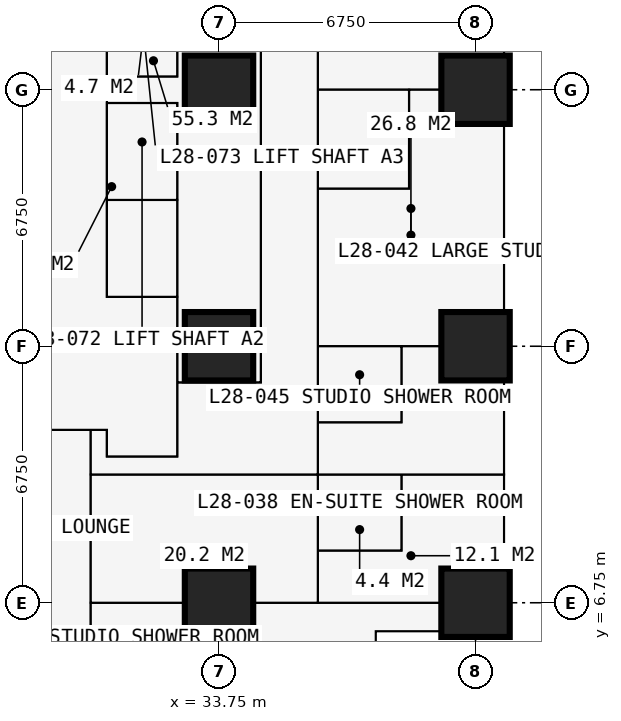
"""IFC4 building model, lengths in metres.
Left out: names, types, materials, properties, quantities, classifications, styles, units other than length and angle.
Written with IfcOpenShell. Run it as: python <this file> out.ifc"""

import sys

from ifc_helpers import new_model, si_unit, direction, frame, frame_2d, origin, origin_2d, place, context, subcontext, project, spatial, rectangle, extrude, element, fill, save


model = new_model("IFC4")
c1 = context("Model", 3, precision=1e-05, world=origin(), true_north=direction((0.0, 1.0)))
c2 = subcontext(c1, "Body", "Model", "MODEL_VIEW")
j1 = project(units=[si_unit("LENGTHUNIT", "METRE"), si_unit("PLANEANGLEUNIT", "RADIAN")], contexts=[c1])
p1 = place(None, origin())
s1 = spatial("IfcSite", under=j1, at=p1, CompositionType="ELEMENT")
p2 = place(p1, origin())
s2 = spatial("IfcBuilding", under=s1, at=p2, CompositionType="ELEMENT")
p3 = place(p2, frame((0.0, 0.0, 105.3)))
s3 = spatial("IfcBuildingStorey", under=s2, at=p3, CompositionType="ELEMENT", Elevation=105.3)
for number, where, z_axis, x_axis in (
    (1, (33.75, 6.75, 0.0), (0.0, 0.0, 1.0), (1.0, 0.0, 0.0)),
    (2, (33.75, 13.5, 0.0), (0.0, 0.0, 1.0), (1.0, 0.0, 0.0)),
    (3, (33.75, 20.25, 0.0), (0.0, 0.0, 1.0), (1.0, 0.0, 0.0)),
    (4, (40.5, 6.75, 0.0), (0.0, 0.0, 1.0), (1.0, 0.0, 0.0)),
    (5, (40.5, 13.5, 0.0), (0.0, 0.0, 1.0), (1.0, 0.0, 0.0)),
    (6, (40.5, 20.25, 0.0), (0.0, 0.0, 1.0), (1.0, 0.0, 0.0)),
):
    element("IfcColumn", number, at=place(p3, frame(where, z_axis=z_axis, x_axis=x_axis)), inside=s3, PredefinedType="COLUMN", context=c2, shape_type="SweptSolid", body=[
        extrude(rectangle(XDim=1.8, YDim=1.8, at=origin_2d()), origin(), (0.0, 0.0, 1.0), 3.6),
    ])
p4 = place(p3, frame((37.875, 2.625, 0.0), z_axis=(0.0, 0.0, 1.0), x_axis=(0.0, 1.0, 0.0)))
e7 = element("IfcWall", 7, at=p4, inside=s3, PredefinedType="SOLIDWALL", context=c2, shape_type="SweptSolid", body=[
    extrude(rectangle(XDim=3.375, YDim=0.3, at=frame_2d((1.688, 0.0))), origin(), (0.0, 0.0, 1.0), 3.375),
])
p5 = place(p4, frame((0.788, 0.0, 0.6)))
e8 = element("IfcOpeningElement", 8, at=p5, cuts=e7, PredefinedType="OPENING", context=c2, shape_type="SweptSolid", body=[
    extrude(rectangle(XDim=1.8, YDim=2.1, at=frame_2d((0.9, 1.05))), frame((0.0, 0.16, 0.0), z_axis=(0.0, -1.0, 0.0), x_axis=(1.0, 0.0, 0.0)), (0.0, 0.0, 1.0), 0.32),
])
p6 = place(p3, frame((37.875, 6.0, 0.0), z_axis=(0.0, 0.0, 1.0), x_axis=(1.0, 0.0, 0.0)))
e9 = element("IfcWall", 9, at=p6, inside=s3, PredefinedType="SOLIDWALL", context=c2, shape_type="SweptSolid", body=[
    extrude(rectangle(XDim=3.375, YDim=0.3, at=frame_2d((1.688, 0.0))), origin(), (0.0, 0.0, 1.0), 3.375),
])
p7 = place(p6, frame((0.343, 0.0, 0.9)))
e10 = element("IfcOpeningElement", 10, at=p7, cuts=e9, PredefinedType="OPENING", context=c2, shape_type="SweptSolid", body=[
    extrude(rectangle(XDim=1.2, YDim=1.8, at=frame_2d((0.6, 0.9))), frame((0.0, 0.16, 0.0), z_axis=(0.0, -1.0, 0.0), x_axis=(1.0, 0.0, 0.0)), (0.0, 0.0, 1.0), 0.32),
])
p8 = place(p3, frame((10.125, 11.3, 0.0), z_axis=(0.0, 0.0, 1.0), x_axis=(1.0, 0.0, 0.0)))
e11 = element("IfcWall", 11, at=p8, inside=s3, PredefinedType="PARTITIONING", context=c2, shape_type="SweptSolid", body=[
    extrude(rectangle(XDim=20.675, YDim=0.15, at=frame_2d((10.337, 0.0))), origin(), (0.0, 0.0, 1.0), 3.375),
])
p9 = place(p8, frame((1.775, 0.0, 0.0)))
e12 = element("IfcOpeningElement", 12, at=p9, cuts=e11, PredefinedType="OPENING", context=c2, shape_type="SweptSolid", body=[
    extrude(rectangle(XDim=1.0, YDim=2.2, at=frame_2d((0.5, 1.1))), frame((0.0, 0.085, 0.0), z_axis=(0.0, -1.0, 0.0), x_axis=(1.0, 0.0, 0.0)), (0.0, 0.0, 1.0), 0.17),
])
p10 = place(p8, frame((11.312, 0.0, 0.0)))
e13 = element("IfcOpeningElement", 13, at=p10, cuts=e11, PredefinedType="OPENING", context=c2, shape_type="SweptSolid", body=[
    extrude(rectangle(XDim=1.0, YDim=2.2, at=frame_2d((0.5, 1.1))), frame((0.0, 0.085, 0.0), z_axis=(0.0, -1.0, 0.0), x_axis=(1.0, 0.0, 0.0)), (0.0, 0.0, 1.0), 0.17),
])
p11 = place(p3, frame((30.375, -0.734, 0.0), z_axis=(0.0, 0.0, 1.0), x_axis=(0.0, 1.0, 0.0)))
e14 = element("IfcWall", 14, at=p11, inside=s3, PredefinedType="PARTITIONING", context=c2, shape_type="SweptSolid", body=[
    extrude(rectangle(XDim=12.034, YDim=0.15, at=frame_2d((6.017, 0.0))), origin(), (0.0, 0.0, 1.0), 3.375),
])
p12 = place(p3, frame((30.375, 6.75, 0.0), z_axis=(0.0, 0.0, 1.0), x_axis=(1.0, 0.0, 0.0)))
e15 = element("IfcWall", 15, at=p12, inside=s3, PredefinedType="PARTITIONING", context=c2, shape_type="SweptSolid", body=[
    extrude(rectangle(XDim=10.859, YDim=0.15, at=frame_2d((5.429, 0.0))), origin(), (0.0, 0.0, 1.0), 2.877),
])
p13 = place(p12, frame((1.45, 0.0, 0.0)))
e16 = element("IfcOpeningElement", 16, at=p13, cuts=e15, PredefinedType="OPENING", context=c2, shape_type="SweptSolid", body=[
    extrude(rectangle(XDim=1.0, YDim=2.2, at=frame_2d((0.5, 1.1))), frame((0.0, 0.085, 0.0), z_axis=(0.0, -1.0, 0.0), x_axis=(1.0, 0.0, 0.0)), (0.0, 0.0, 1.0), 0.17),
])
p14 = place(p3, frame((30.375, 10.125, 0.0), z_axis=(0.0, 0.0, 1.0), x_axis=(1.0, 0.0, 0.0)))
e17 = element("IfcWall", 17, at=p14, inside=s3, PredefinedType="PARTITIONING", context=c2, shape_type="SweptSolid", body=[
    extrude(rectangle(XDim=10.859, YDim=0.15, at=frame_2d((5.429, 0.0))), origin(), (0.0, 0.0, 1.0), 3.375),
])
p15 = place(p14, frame((2.5, 0.0, 0.0)))
e18 = element("IfcOpeningElement", 18, at=p15, cuts=e17, PredefinedType="OPENING", context=c2, shape_type="SweptSolid", body=[
    extrude(rectangle(XDim=1.0, YDim=2.2, at=frame_2d((0.5, 1.1))), frame((0.0, 0.085, 0.0), z_axis=(0.0, -1.0, 0.0), x_axis=(1.0, 0.0, 0.0)), (0.0, 0.0, 1.0), 0.17),
])
p16 = place(p3, frame((30.8, 10.6, 0.0), z_axis=(0.0, 0.0, 1.0), x_axis=(0.0, 1.0, 0.0)))
e19 = element("IfcWall", 19, at=p16, inside=s3, PredefinedType="PARTITIONING", context=c2, shape_type="SweptSolid", body=[
    extrude(rectangle(XDim=0.7, YDim=0.15, at=frame_2d((0.35, 0.0))), origin(), (0.0, 0.0, 1.0), 3.375),
])
p17 = place(p3, frame((30.8, 10.6, 0.0), z_axis=(0.0, 0.0, 1.0), x_axis=(1.0, 0.0, 0.0)))
e20 = element("IfcWall", 20, at=p17, inside=s3, PredefinedType="PARTITIONING", context=c2, shape_type="SweptSolid", body=[
    extrude(rectangle(XDim=1.85, YDim=0.15, at=frame_2d((0.925, 0.0))), origin(), (0.0, 0.0, 1.0), 3.375),
])
p18 = place(p3, frame((30.8, 14.8, 0.0), z_axis=(0.0, 0.0, 1.0), x_axis=(0.0, 1.0, 0.0)))
e21 = element("IfcWall", 21, at=p18, inside=s3, PredefinedType="PARTITIONING", context=c2, shape_type="SweptSolid", body=[
    extrude(rectangle(XDim=10.9, YDim=0.15, at=frame_2d((5.45, 0.0))), origin(), (0.0, 0.0, 1.0), 3.375),
])
p19 = place(p18, frame((0.75, 0.0, 0.0)))
e22 = element("IfcOpeningElement", 22, at=p19, cuts=e21, PredefinedType="OPENING", context=c2, shape_type="SweptSolid", body=[
    extrude(rectangle(XDim=1.1, YDim=2.2, at=frame_2d((0.55, 1.1))), frame((0.0, 0.085, 0.0), z_axis=(0.0, -1.0, 0.0), x_axis=(1.0, 0.0, 0.0)), (0.0, 0.0, 1.0), 0.17),
])
p20 = place(p18, frame((3.25, 0.0, 0.0)))
e23 = element("IfcOpeningElement", 23, at=p20, cuts=e21, PredefinedType="OPENING", context=c2, shape_type="SweptSolid", body=[
    extrude(rectangle(XDim=1.1, YDim=2.2, at=frame_2d((0.55, 1.1))), frame((0.0, 0.085, 0.0), z_axis=(0.0, -1.0, 0.0), x_axis=(1.0, 0.0, 0.0)), (0.0, 0.0, 1.0), 0.17),
])
p21 = place(p18, frame((6.5, 0.0, 0.0)))
e24 = element("IfcOpeningElement", 24, at=p21, cuts=e21, PredefinedType="OPENING", context=c2, shape_type="SweptSolid", body=[
    extrude(rectangle(XDim=1.1, YDim=2.2, at=frame_2d((0.55, 1.1))), frame((0.0, 0.085, 0.0), z_axis=(0.0, -1.0, 0.0), x_axis=(1.0, 0.0, 0.0)), (0.0, 0.0, 1.0), 0.17),
])
p22 = place(p18, frame((9.05, 0.0, 0.0)))
e25 = element("IfcOpeningElement", 25, at=p22, cuts=e21, PredefinedType="OPENING", context=c2, shape_type="SweptSolid", body=[
    extrude(rectangle(XDim=1.1, YDim=2.2, at=frame_2d((0.55, 1.1))), frame((0.0, 0.085, 0.0), z_axis=(0.0, -1.0, 0.0), x_axis=(1.0, 0.0, 0.0)), (0.0, 0.0, 1.0), 0.17),
])
for number, where, z_axis, x_axis in (
    (26, (30.8, 14.8, 0.0), (0.0, 0.0, 1.0), (1.0, 0.0, 0.0)),
    (27, (30.8, 17.35, 0.0), (0.0, 0.0, 1.0), (1.0, 0.0, 0.0)),
    (28, (30.8, 19.9, 0.0), (0.0, 0.0, 1.0), (1.0, 0.0, 0.0)),
    (29, (30.8, 20.6, 0.0), (0.0, 0.0, 1.0), (1.0, 0.0, 0.0)),
):
    element("IfcWall", number, at=place(p3, frame(where, z_axis=z_axis, x_axis=x_axis)), inside=s3, PredefinedType="SHEAR", context=c2, shape_type="SweptSolid", body=[
        extrude(rectangle(XDim=1.85, YDim=0.1, at=frame_2d((0.925, 0.0))), origin(), (0.0, 0.0, 1.0), 3.375),
    ])
p23 = place(p3, frame((32.65, 10.6, 0.0), z_axis=(0.0, 0.0, 1.0), x_axis=(0.0, 1.0, 0.0)))
e30 = element("IfcWall", 30, at=p23, inside=s3, PredefinedType="SHEAR", context=c2, shape_type="SweptSolid", body=[
    extrude(rectangle(XDim=9.3, YDim=0.1, at=frame_2d((4.65, 0.0))), origin(), (0.0, 0.0, 1.0), 3.375),
])
p24 = place(p23, frame((0.5, 0.0, 0.0)))
e31 = element("IfcOpeningElement", 31, at=p24, cuts=e30, PredefinedType="OPENING", context=c2, shape_type="SweptSolid", body=[
    extrude(rectangle(XDim=1.0, YDim=2.2, at=frame_2d((0.5, 1.1))), frame((0.0, 0.06, 0.0), z_axis=(0.0, -1.0, 0.0), x_axis=(1.0, 0.0, 0.0)), (0.0, 0.0, 1.0), 0.12),
])
p25 = place(p3, frame((32.65, 12.55, 0.0), z_axis=(0.0, 0.0, 1.0), x_axis=(1.0, 0.0, 0.0)))
e32 = element("IfcWall", 32, at=p25, inside=s3, PredefinedType="PARTITIONING", context=c2, shape_type="SweptSolid", body=[
    extrude(rectangle(XDim=2.2, YDim=0.15, at=frame_2d((1.1, 0.0))), origin(), (0.0, 0.0, 1.0), 3.375),
])
p26 = place(p3, frame((32.65, 20.6, 0.0), z_axis=(0.0, 0.0, 1.0), x_axis=(0.0, 1.0, 0.0)))
e33 = element("IfcWall", 33, at=p26, inside=s3, PredefinedType="PARTITIONING", context=c2, shape_type="SweptSolid", body=[
    extrude(rectangle(XDim=5.1, YDim=0.15, at=frame_2d((2.55, 0.0))), origin(), (0.0, 0.0, 1.0), 3.375),
])
p27 = place(p3, frame((34.85, 12.55, 0.0), z_axis=(0.0, 0.0, 1.0), x_axis=(0.0, 1.0, 0.0)))
e34 = element("IfcWall", 34, at=p27, inside=s3, PredefinedType="PARTITIONING", context=c2, shape_type="SweptSolid", body=[
    extrude(rectangle(XDim=17.825, YDim=0.15, at=frame_2d((8.913, 0.0))), origin(), (0.0, 0.0, 1.0), 3.375),
])
p28 = place(p27, frame((8.6, 0.0, 0.0)))
e35 = element("IfcOpeningElement", 35, at=p28, cuts=e34, PredefinedType="OPENING", context=c2, shape_type="SweptSolid", body=[
    extrude(rectangle(XDim=0.95, YDim=2.2, at=frame_2d((0.475, 1.1))), frame((0.0, 0.085, 0.0), z_axis=(0.0, -1.0, 0.0), x_axis=(1.0, 0.0, 0.0)), (0.0, 0.0, 1.0), 0.17),
])
p29 = place(p3, frame((36.35, 6.75, 0.0), z_axis=(0.0, 0.0, 1.0), x_axis=(0.0, 1.0, 0.0)))
e36 = element("IfcWall", 36, at=p29, inside=s3, PredefinedType="PARTITIONING", context=c2, shape_type="SweptSolid", body=[
    extrude(rectangle(XDim=20.25, YDim=0.15, at=frame_2d((10.125, 0.0))), origin(), (0.0, 0.0, 1.0), 3.375),
])
p30 = place(p29, frame((0.2, 0.0, 0.0)))
e37 = element("IfcOpeningElement", 37, at=p30, cuts=e36, PredefinedType="OPENING", context=c2, shape_type="SweptSolid", body=[
    extrude(rectangle(XDim=0.95, YDim=2.2, at=frame_2d((0.475, 1.1))), frame((0.0, 0.085, 0.0), z_axis=(0.0, -1.0, 0.0), x_axis=(1.0, 0.0, 0.0)), (0.0, 0.0, 1.0), 0.17),
])
p31 = place(p29, frame((15.1, 0.0, 0.0)))
e38 = element("IfcOpeningElement", 38, at=p31, cuts=e36, PredefinedType="OPENING", context=c2, shape_type="SweptSolid", body=[
    extrude(rectangle(XDim=0.95, YDim=2.2, at=frame_2d((0.475, 1.1))), frame((0.0, 0.085, 0.0), z_axis=(0.0, -1.0, 0.0), x_axis=(1.0, 0.0, 0.0)), (0.0, 0.0, 1.0), 0.17),
])
p32 = place(p29, frame((8.35, 0.0, 0.0)))
e39 = element("IfcOpeningElement", 39, at=p32, cuts=e36, PredefinedType="OPENING", context=c2, shape_type="SweptSolid", body=[
    extrude(rectangle(XDim=0.95, YDim=2.2, at=frame_2d((0.475, 1.1))), frame((0.0, 0.085, 0.0), z_axis=(0.0, -1.0, 0.0), x_axis=(1.0, 0.0, 0.0)), (0.0, 0.0, 1.0), 0.17),
])
p33 = place(p29, frame((3.575, 0.0, 0.0)))
e40 = element("IfcOpeningElement", 40, at=p33, cuts=e36, PredefinedType="OPENING", context=c2, shape_type="SweptSolid", body=[
    extrude(rectangle(XDim=0.95, YDim=2.2, at=frame_2d((0.475, 1.1))), frame((0.0, 0.085, 0.0), z_axis=(0.0, -1.0, 0.0), x_axis=(1.0, 0.0, 0.0)), (0.0, 0.0, 1.0), 0.17),
])
p34 = place(p3, frame((36.35, 8.125, 0.0), z_axis=(0.0, 0.0, 1.0), x_axis=(1.0, 0.0, 0.0)))
e41 = element("IfcWall", 41, at=p34, inside=s3, PredefinedType="PARTITIONING", context=c2, shape_type="SweptSolid", body=[
    extrude(rectangle(XDim=2.2, YDim=0.1, at=frame_2d((1.1, 0.0))), origin(), (0.0, 0.0, 1.0), 3.375),
])
p35 = place(p34, frame((0.65, 0.0, 0.0)))
e42 = element("IfcOpeningElement", 42, at=p35, cuts=e41, PredefinedType="OPENING", context=c2, shape_type="SweptSolid", body=[
    extrude(rectangle(XDim=0.9, YDim=2.2, at=frame_2d((0.45, 1.1))), frame((0.0, 0.06, 0.0), z_axis=(0.0, -1.0, 0.0), x_axis=(1.0, 0.0, 0.0)), (0.0, 0.0, 1.0), 0.12),
])
p36 = place(p3, frame((36.35, 11.5, 0.0), z_axis=(0.0, 0.0, 1.0), x_axis=(1.0, 0.0, 0.0)))
e43 = element("IfcWall", 43, at=p36, inside=s3, PredefinedType="PARTITIONING", context=c2, shape_type="SweptSolid", body=[
    extrude(rectangle(XDim=2.2, YDim=0.1, at=frame_2d((1.1, 0.0))), origin(), (0.0, 0.0, 1.0), 3.375),
])
p37 = place(p3, frame((36.35, 13.5, 0.0), z_axis=(0.0, 0.0, 1.0), x_axis=(1.0, 0.0, 0.0)))
e44 = element("IfcWall", 44, at=p37, inside=s3, PredefinedType="PARTITIONING", context=c2, shape_type="SweptSolid", body=[
    extrude(rectangle(XDim=4.884, YDim=0.175, at=frame_2d((2.442, 0.0))), origin(), (0.0, 0.0, 1.0), 2.61),
])
p38 = place(p37, frame((0.65, 0.0, 0.0)))
e45 = element("IfcOpeningElement", 45, at=p38, cuts=e44, PredefinedType="OPENING", context=c2, shape_type="SweptSolid", body=[
    extrude(rectangle(XDim=0.9, YDim=2.2, at=frame_2d((0.45, 1.1))), frame((0.0, 0.097, 0.0), z_axis=(0.0, -1.0, 0.0), x_axis=(1.0, 0.0, 0.0)), (0.0, 0.0, 1.0), 0.195),
])
p39 = place(p3, frame((36.35, 17.65, 0.0), z_axis=(0.0, 0.0, 1.0), x_axis=(1.0, 0.0, 0.0)))
e46 = element("IfcWall", 46, at=p39, inside=s3, PredefinedType="PARTITIONING", context=c2, shape_type="SweptSolid", body=[
    extrude(rectangle(XDim=2.4, YDim=0.1, at=frame_2d((1.2, 0.0))), origin(), (0.0, 0.0, 1.0), 3.375),
])
p40 = place(p3, frame((36.35, 20.25, 0.0), z_axis=(0.0, 0.0, 1.0), x_axis=(1.0, 0.0, 0.0)))
e47 = element("IfcWall", 47, at=p40, inside=s3, PredefinedType="PARTITIONING", context=c2, shape_type="SweptSolid", body=[
    extrude(rectangle(XDim=4.884, YDim=0.175, at=frame_2d((2.442, 0.0))), origin(), (0.0, 0.0, 1.0), 2.61),
])
p41 = place(p40, frame((0.75, 0.0, 0.0)))
e48 = element("IfcOpeningElement", 48, at=p41, cuts=e47, PredefinedType="OPENING", context=c2, shape_type="SweptSolid", body=[
    extrude(rectangle(XDim=0.9, YDim=2.2, at=frame_2d((0.45, 1.1))), frame((0.0, 0.097, 0.0), z_axis=(0.0, -1.0, 0.0), x_axis=(1.0, 0.0, 0.0)), (0.0, 0.0, 1.0), 0.195),
])
for number, where, z_axis, x_axis in (
    (49, (38.55, 8.125, 0.0), (0.0, 0.0, 1.0), (0.0, 1.0, 0.0)),
    (50, (38.55, 11.5, 0.0), (0.0, 0.0, 1.0), (0.0, 1.0, 0.0)),
):
    element("IfcWall", number, at=place(p3, frame(where, z_axis=z_axis, x_axis=x_axis)), inside=s3, PredefinedType="PARTITIONING", context=c2, shape_type="SweptSolid", body=[
        extrude(rectangle(XDim=2.0, YDim=0.1, at=frame_2d((1.0, 0.0))), origin(), (0.0, 0.0, 1.0), 3.375),
    ])
p42 = place(p3, frame((38.75, 17.65, 0.0), z_axis=(0.0, 0.0, 1.0), x_axis=(0.0, 1.0, 0.0)))
e51 = element("IfcWall", 51, at=p42, inside=s3, PredefinedType="PARTITIONING", context=c2, shape_type="SweptSolid", body=[
    extrude(rectangle(XDim=2.6, YDim=0.1, at=frame_2d((1.3, 0.0))), origin(), (0.0, 0.0, 1.0), 3.375),
])
p43 = place(p7, origin())
e52 = element("IfcWindow", 52, at=p43, inside=s3, PartitioningType="SINGLE_PANEL", PredefinedType="WINDOW", context=c2, shape_type="SweptSolid", body=[
    extrude(rectangle(XDim=1.2, YDim=1.8, at=frame_2d((0.6, 0.9))), frame((0.0, 0.03, 0.0), z_axis=(0.0, -1.0, 0.0), x_axis=(1.0, 0.0, 0.0)), (0.0, 0.0, 1.0), 0.06),
])
fill(e10, e52)
p44 = place(p13, origin())
e53 = element("IfcDoor", 53, at=p44, inside=s3, OperationType="SINGLE_SWING_LEFT", PredefinedType="DOOR", context=c2, shape_type="SweptSolid", body=[
    extrude(rectangle(XDim=1.0, YDim=2.2, at=frame_2d((0.5, 1.1))), frame((0.0, 0.025, 0.0), z_axis=(0.0, -1.0, 0.0), x_axis=(1.0, 0.0, 0.0)), (0.0, 0.0, 1.0), 0.05),
])
fill(e16, e53)
p45 = place(p30, origin())
e54 = element("IfcDoor", 54, at=p45, inside=s3, OperationType="SINGLE_SWING_LEFT", PredefinedType="DOOR", context=c2, shape_type="SweptSolid", body=[
    extrude(rectangle(XDim=0.95, YDim=2.2, at=frame_2d((0.475, 1.1))), frame((0.0, 0.025, 0.0), z_axis=(0.0, -1.0, 0.0), x_axis=(1.0, 0.0, 0.0)), (0.0, 0.0, 1.0), 0.05),
])
fill(e37, e54)
p46 = place(p35, origin())
e55 = element("IfcDoor", 55, at=p46, inside=s3, OperationType="SINGLE_SWING_RIGHT", PredefinedType="DOOR", context=c2, shape_type="SweptSolid", body=[
    extrude(rectangle(XDim=0.9, YDim=2.2, at=frame_2d((0.45, 1.1))), frame((0.0, 0.025, 0.0), z_axis=(0.0, -1.0, 0.0), x_axis=(1.0, 0.0, 0.0)), (0.0, 0.0, 1.0), 0.05),
])
fill(e42, e55)
p47 = place(p15, origin())
e56 = element("IfcDoor", 56, at=p47, inside=s3, OperationType="SINGLE_SWING_LEFT", PredefinedType="DOOR", context=c2, shape_type="SweptSolid", body=[
    extrude(rectangle(XDim=1.0, YDim=2.2, at=frame_2d((0.5, 1.1))), frame((0.0, 0.025, 0.0), z_axis=(0.0, -1.0, 0.0), x_axis=(1.0, 0.0, 0.0)), (0.0, 0.0, 1.0), 0.05),
])
fill(e18, e56)
p48 = place(p32, origin())
e57 = element("IfcDoor", 57, at=p48, inside=s3, OperationType="SINGLE_SWING_LEFT", PredefinedType="DOOR", context=c2, shape_type="SweptSolid", body=[
    extrude(rectangle(XDim=0.95, YDim=2.2, at=frame_2d((0.475, 1.1))), frame((0.0, 0.025, 0.0), z_axis=(0.0, -1.0, 0.0), x_axis=(1.0, 0.0, 0.0)), (0.0, 0.0, 1.0), 0.05),
])
fill(e39, e57)
p49 = place(p41, origin())
e58 = element("IfcDoor", 58, at=p49, inside=s3, OperationType="SINGLE_SWING_RIGHT", PredefinedType="DOOR", context=c2, shape_type="SweptSolid", body=[
    extrude(rectangle(XDim=0.9, YDim=2.2, at=frame_2d((0.45, 1.1))), frame((0.0, 0.025, 0.0), z_axis=(0.0, -1.0, 0.0), x_axis=(1.0, 0.0, 0.0)), (0.0, 0.0, 1.0), 0.05),
])
fill(e48, e58)
p50 = place(p33, origin())
e59 = element("IfcDoor", 59, at=p50, inside=s3, OperationType="SINGLE_SWING_LEFT", PredefinedType="DOOR", context=c2, shape_type="SweptSolid", body=[
    extrude(rectangle(XDim=0.95, YDim=2.2, at=frame_2d((0.475, 1.1))), frame((0.0, 0.025, 0.0), z_axis=(0.0, -1.0, 0.0), x_axis=(1.0, 0.0, 0.0)), (0.0, 0.0, 1.0), 0.05),
])
fill(e40, e59)
p51 = place(p38, origin())
e60 = element("IfcDoor", 60, at=p51, inside=s3, OperationType="SINGLE_SWING_RIGHT", PredefinedType="DOOR", context=c2, shape_type="SweptSolid", body=[
    extrude(rectangle(XDim=0.9, YDim=2.2, at=frame_2d((0.45, 1.1))), frame((0.0, 0.025, 0.0), z_axis=(0.0, -1.0, 0.0), x_axis=(1.0, 0.0, 0.0)), (0.0, 0.0, 1.0), 0.05),
])
fill(e45, e60)
p52 = place(p24, origin())
e61 = element("IfcDoor", 61, at=p52, inside=s3, OperationType="SINGLE_SWING_LEFT", PredefinedType="DOOR", context=c2, shape_type="SweptSolid", body=[
    extrude(rectangle(XDim=1.0, YDim=2.2, at=frame_2d((0.5, 1.1))), frame((0.0, 0.025, 0.0), z_axis=(0.0, -1.0, 0.0), x_axis=(1.0, 0.0, 0.0)), (0.0, 0.0, 1.0), 0.05),
])
fill(e31, e61)
p53 = place(p28, origin())
e62 = element("IfcDoor", 62, at=p53, inside=s3, OperationType="SINGLE_SWING_LEFT", PredefinedType="DOOR", context=c2, shape_type="SweptSolid", body=[
    extrude(rectangle(XDim=0.95, YDim=2.2, at=frame_2d((0.475, 1.1))), frame((0.0, 0.025, 0.0), z_axis=(0.0, -1.0, 0.0), x_axis=(1.0, 0.0, 0.0)), (0.0, 0.0, 1.0), 0.05),
])
fill(e35, e62)
p54 = place(p19, origin())
e63 = element("IfcDoor", 63, at=p54, inside=s3, OperationType="DOUBLE_DOOR_SLIDING", PredefinedType="DOOR", context=c2, shape_type="SweptSolid", body=[
    extrude(rectangle(XDim=1.1, YDim=2.2, at=frame_2d((0.55, 1.1))), frame((0.0, 0.025, 0.0), z_axis=(0.0, -1.0, 0.0), x_axis=(1.0, 0.0, 0.0)), (0.0, 0.0, 1.0), 0.05),
])
fill(e22, e63)
p55 = place(p20, origin())
e64 = element("IfcDoor", 64, at=p55, inside=s3, OperationType="DOUBLE_DOOR_SLIDING", PredefinedType="DOOR", context=c2, shape_type="SweptSolid", body=[
    extrude(rectangle(XDim=1.1, YDim=2.2, at=frame_2d((0.55, 1.1))), frame((0.0, 0.025, 0.0), z_axis=(0.0, -1.0, 0.0), x_axis=(1.0, 0.0, 0.0)), (0.0, 0.0, 1.0), 0.05),
])
fill(e23, e64)
save(model, sys.argv[1])
